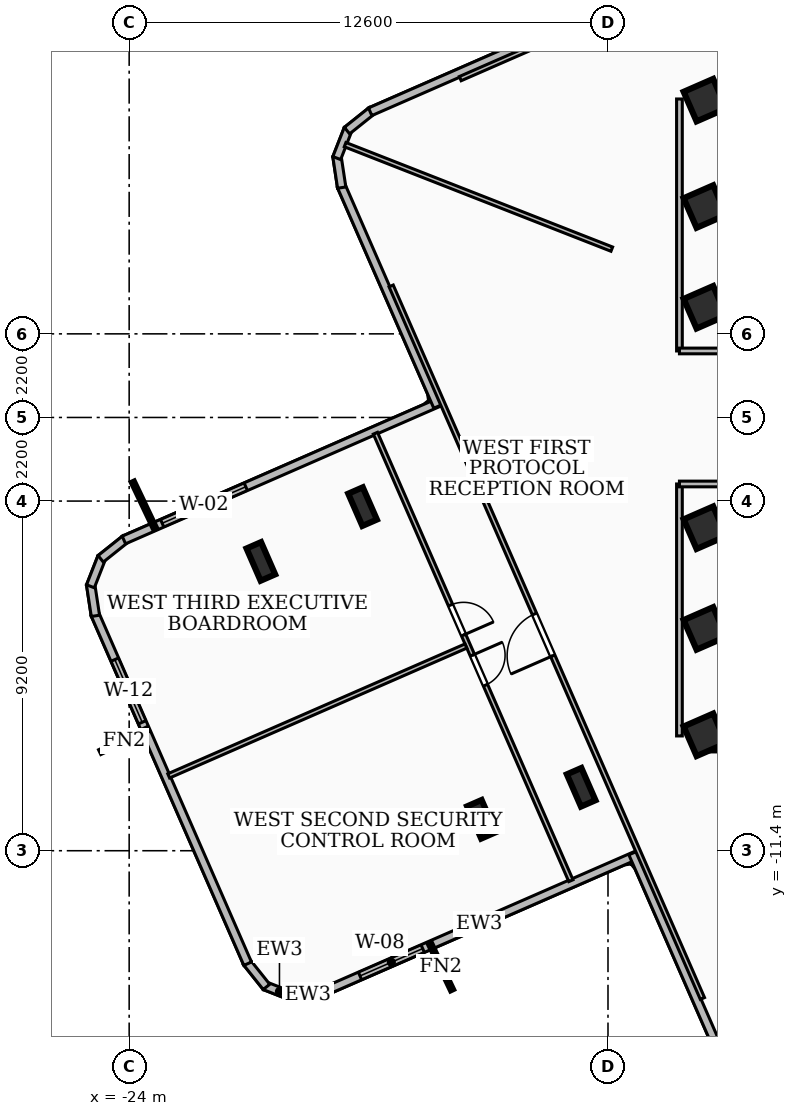
"""IFC4 building model, lengths in metres.
Left out: names, types, materials, properties, quantities, classifications, styles, units other than length and angle.
Written with IfcOpenShell. Run it as: python <this file> out.ifc"""

import sys

from ifc_helpers import new_model, si_unit, direction, frame, frame_2d, origin, origin_2d, place, context, subcontext, project, spatial, rectangle, i_section, extrude, element, fill, save


model = new_model("IFC4")
c1 = context("Model", 3, precision=1e-05, world=origin(), true_north=direction((0.0, 1.0)))
c2 = subcontext(c1, "Body", "Model", "MODEL_VIEW")
j1 = project(units=[si_unit("LENGTHUNIT", "METRE"), si_unit("PLANEANGLEUNIT", "RADIAN")], contexts=[c1])
p1 = place(None, origin())
s1 = spatial("IfcSite", under=j1, at=p1, CompositionType="ELEMENT")
p2 = place(p1, origin())
s2 = spatial("IfcBuilding", under=s1, at=p2, CompositionType="ELEMENT")
p3 = place(p2, frame((0.0, 0.0, 181.08)))
s3 = spatial("IfcBuildingStorey", under=s2, at=p3, CompositionType="ELEMENT", Elevation=181.08)
for number, where, z_axis, x_axis in (
    (1, (-8.78, 8.535, 0.0), (0.0, 0.0, 1.0), (1.0, 0.0, 0.0)),
    (2, (8.78, -8.535, 0.0), (0.0, 0.0, 1.0), (-1.0, 0.0, 0.0)),
):
    element("IfcWall", number, at=place(p3, frame(where, z_axis=z_axis, x_axis=x_axis)), inside=s3, PredefinedType="SHEAR", context=c2, shape_type="SweptSolid", body=[
        extrude(rectangle(XDim=17.56, YDim=0.45, at=frame_2d((8.78, 0.0))), origin(), (0.0, 0.0, 1.0), 3.34),
    ])
for number, where, z_axis, x_axis in (
    (3, (-8.85, -5.55, 0.0), (0.0, 0.0, 1.0), (0.916, 0.4, 0.0)),
    (4, (-8.85, -2.9, 0.0), (0.0, 0.0, 1.0), (0.916, 0.4, 0.0)),
    (5, (-8.85, 2.9, 0.0), (0.0, 0.0, 1.0), (0.916, 0.4, 0.0)),
    (6, (-8.85, 5.55, 0.0), (0.0, 0.0, 1.0), (0.916, 0.4, 0.0)),
    (7, (-8.85, 8.35, 0.0), (0.0, 0.0, 1.0), (0.916, 0.4, 0.0)),
    (8, (-8.85, -8.35, 0.0), (0.0, 0.0, 1.0), (0.916, 0.4, 0.0)),
):
    element("IfcColumn", number, at=place(p3, frame(where, z_axis=z_axis, x_axis=x_axis)), inside=s3, PredefinedType="COLUMN", context=c2, shape_type="SweptSolid", body=[
        extrude(rectangle(XDim=0.85, YDim=0.85, at=origin_2d()), origin(), (0.0, 0.0, 1.0), 3.6),
    ])
for number, where, z_axis, x_axis in (
    (9, (-17.858, -2.346, 0.0), (0.0, 0.0, 1.0), (0.916, 0.4, 0.0)),
    (10, (-12.106, -9.731, 0.0), (0.0, 0.0, 1.0), (0.916, 0.4, 0.0)),
    (11, (-20.535, -3.788, 0.0), (0.0, 0.0, 1.0), (0.916, 0.4, 0.0)),
    (12, (-14.731, -10.573, 0.0), (0.0, 0.0, 1.0), (0.916, 0.4, 0.0)),
):
    element("IfcColumn", number, at=place(p3, frame(where, z_axis=z_axis, x_axis=x_axis)), inside=s3, PredefinedType="COLUMN", context=c2, shape_type="SweptSolid", body=[
        extrude(i_section(OverallWidth=0.418, OverallDepth=0.927, WebThickness=0.019, FlangeThickness=0.032, at=origin_2d()), origin(), (0.0, 0.0, 1.0), 3.6),
    ])
p4 = place(p3, frame((-10.634, -11.51, 0.0), z_axis=(0.0, 0.0, 1.0), x_axis=(-0.91637186732, -0.400328116405, 0.0)))
e13 = element("IfcWall", 13, at=p4, inside=s3, PredefinedType="SOLIDWALL", context=c2, shape_type="SweptSolid", body=[
    extrude(rectangle(XDim=9.058, YDim=0.22, at=frame_2d((4.529, 0.0))), origin(), (0.0, 0.0, 1.0), 3.34),
])
p5 = place(p4, frame((6.157, 0.0, 0.85)))
e14 = element("IfcOpeningElement", 14, at=p5, cuts=e13, PredefinedType="OPENING", context=c2, shape_type="SweptSolid", body=[
    extrude(rectangle(XDim=1.8, YDim=1.8, at=frame_2d((0.9, 0.9))), frame((0.0, 0.12, 0.0), z_axis=(0.0, -1.0, 0.0), x_axis=(1.0, 0.0, 0.0)), (0.0, 0.0, 1.0), 0.24),
])
p6 = place(p3, frame((-18.886, -15.122, 0.0), z_axis=(0.0, 0.0, 1.0), x_axis=(-0.988566813851, -0.150783469095, 0.0)))
e15 = element("IfcWall", 15, at=p6, inside=s3, PredefinedType="SOLIDWALL", context=c2, shape_type="SweptSolid", body=[
    extrude(rectangle(XDim=0.835, YDim=0.22, at=frame_2d((0.418, 0.0))), origin(), (0.0, 0.0, 1.0), 3.34),
])
p7 = place(p3, frame((-19.664, -15.253, 0.0), z_axis=(0.0, 0.0, 1.0), x_axis=(-0.930965246498, 0.36510780574, 0.0)))
e16 = element("IfcWall", 16, at=p7, inside=s3, PredefinedType="SOLIDWALL", context=c2, shape_type="SweptSolid", body=[
    extrude(rectangle(XDim=0.818, YDim=0.22, at=frame_2d((0.409, 0.0))), origin(), (0.0, 0.0, 1.0), 3.34),
])
p8 = place(p3, frame((-20.387, -14.983, 0.0), z_axis=(0.0, 0.0, 1.0), x_axis=(-0.62376780326, 0.781609702867, 0.0)))
e17 = element("IfcWall", 17, at=p8, inside=s3, PredefinedType="SOLIDWALL", context=c2, shape_type="SweptSolid", body=[
    extrude(rectangle(XDim=0.835, YDim=0.22, at=frame_2d((0.417, 0.0))), origin(), (0.0, 0.0, 1.0), 3.34),
])
p9 = place(p3, frame((-20.882, -14.373, 0.0), z_axis=(0.0, 0.0, 1.0), x_axis=(-0.400368522196, 0.916354214502, 0.0)))
e18 = element("IfcWall", 18, at=p9, inside=s3, PredefinedType="SOLIDWALL", context=c2, shape_type="SweptSolid", body=[
    extrude(rectangle(XDim=10.041, YDim=0.22, at=frame_2d((5.021, 0.0))), origin(), (0.0, 0.0, 1.0), 3.34),
])
p10 = place(p9, frame((6.932, 0.0, 0.85)))
e19 = element("IfcOpeningElement", 19, at=p10, cuts=e18, PredefinedType="OPENING", context=c2, shape_type="SweptSolid", body=[
    extrude(rectangle(XDim=1.8, YDim=1.6, at=frame_2d((0.9, 0.8))), frame((0.0, 0.12, 0.0), z_axis=(0.0, -1.0, 0.0), x_axis=(1.0, 0.0, 0.0)), (0.0, 0.0, 1.0), 0.24),
])
p11 = place(p3, frame((-24.888, -5.22, 0.0), z_axis=(0.0, 0.0, 1.0), x_axis=(-0.150783469095, 0.988566813851, 0.0)))
e20 = element("IfcWall", 20, at=p11, inside=s3, PredefinedType="SOLIDWALL", context=c2, shape_type="SweptSolid", body=[
    extrude(rectangle(XDim=0.835, YDim=0.22, at=frame_2d((0.418, 0.0))), origin(), (0.0, 0.0, 1.0), 3.34),
])
p12 = place(p3, frame((-25.019, -4.442, 0.0), z_axis=(0.0, 0.0, 1.0), x_axis=(0.365366290938, 0.93086383185, 0.0)))
e21 = element("IfcWall", 21, at=p12, inside=s3, PredefinedType="SOLIDWALL", context=c2, shape_type="SweptSolid", body=[
    extrude(rectangle(XDim=0.819, YDim=0.22, at=frame_2d((0.409, 0.0))), origin(), (0.0, 0.0, 1.0), 3.34),
])
p13 = place(p3, frame((-24.749, -3.719, 0.0), z_axis=(0.0, 0.0, 1.0), x_axis=(0.781723393747, 0.623625316731, 0.0)))
e22 = element("IfcWall", 22, at=p13, inside=s3, PredefinedType="SOLIDWALL", context=c2, shape_type="SweptSolid", body=[
    extrude(rectangle(XDim=0.835, YDim=0.22, at=frame_2d((0.418, 0.0))), origin(), (0.0, 0.0, 1.0), 3.34),
])
p14 = place(p3, frame((-24.139, -3.224, 0.0), z_axis=(0.0, 0.0, 1.0), x_axis=(0.916356987606, 0.400362175117, 0.0)))
e23 = element("IfcWall", 23, at=p14, inside=s3, PredefinedType="SOLIDWALL", context=c2, shape_type="SweptSolid", body=[
    extrude(rectangle(XDim=9.06, YDim=0.22, at=frame_2d((4.53, 0.0))), origin(), (0.0, 0.0, 1.0), 3.34),
])
p15 = place(p14, frame((1.1, 0.0, 0.85)))
e24 = element("IfcOpeningElement", 24, at=p15, cuts=e23, PredefinedType="OPENING", context=c2, shape_type="SweptSolid", body=[
    extrude(rectangle(XDim=2.4, YDim=2.1, at=frame_2d((1.2, 1.05))), frame((0.0, 0.12, 0.0), z_axis=(0.0, -1.0, 0.0), x_axis=(1.0, 0.0, 0.0)), (0.0, 0.0, 1.0), 0.24),
])
p16 = place(p3, frame((-15.883, 0.287, 0.0), z_axis=(0.0, 0.0, 1.0), x_axis=(-0.400352069216, 0.916361402872, 0.0)))
e25 = element("IfcWall", 25, at=p16, inside=s3, PredefinedType="SOLIDWALL", context=c2, shape_type="SweptSolid", body=[
    extrude(rectangle(XDim=6.339, YDim=0.22, at=frame_2d((3.169, 0.0))), origin(), (0.0, 0.0, 1.0), 3.34),
])
p17 = place(p3, frame((-18.407, 6.048, 0.0), z_axis=(0.0, 0.0, 1.0), x_axis=(-0.149814047271, 0.988714190876, 0.0)))
e26 = element("IfcWall", 26, at=p17, inside=s3, PredefinedType="SOLIDWALL", context=c2, shape_type="SweptSolid", body=[
    extrude(rectangle(XDim=0.834, YDim=0.22, at=frame_2d((0.417, 0.0))), origin(), (0.0, 0.0, 1.0), 3.34),
])
p18 = place(p3, frame((-18.537, 6.825, 0.0), z_axis=(0.0, 0.0, 1.0), x_axis=(0.364331843435, 0.931269191941, 0.0)))
e27 = element("IfcWall", 27, at=p18, inside=s3, PredefinedType="SOLIDWALL", context=c2, shape_type="SweptSolid", body=[
    extrude(rectangle(XDim=0.818, YDim=0.22, at=frame_2d((0.409, 0.0))), origin(), (0.0, 0.0, 1.0), 3.34),
])
p19 = place(p3, frame((-18.268, 7.548, 0.0), z_axis=(0.0, 0.0, 1.0), x_axis=(0.781153625844, 0.624338860581, 0.0)))
e28 = element("IfcWall", 28, at=p19, inside=s3, PredefinedType="SOLIDWALL", context=c2, shape_type="SweptSolid", body=[
    extrude(rectangle(XDim=0.836, YDim=0.22, at=frame_2d((0.418, 0.0))), origin(), (0.0, 0.0, 1.0), 3.34),
])
for number, where, z_axis, x_axis in (
    (29, (-17.658, 8.044, 0.0), (0.0, 0.0, 1.0), (0.916, 0.4, 0.0)),
    (30, (-8.044, -17.658, 0.0), (0.0, 0.0, 1.0), (-0.4, 0.916, 0.0)),
):
    element("IfcWall", number, at=place(p3, frame(where, z_axis=z_axis, x_axis=x_axis)), inside=s3, PredefinedType="SOLIDWALL", context=c2, shape_type="SweptSolid", body=[
        extrude(rectangle(XDim=6.759, YDim=0.22, at=frame_2d((3.38, 0.0))), origin(), (0.0, 0.0, 1.0), 3.34),
    ])
p20 = place(p3, frame((-9.52, 1.75, 0.0), z_axis=(0.0, 0.0, 1.0), x_axis=(0.0, 1.0, 0.0)))
e31 = element("IfcWall", 31, at=p20, inside=s3, PredefinedType="PARTITIONING", context=c2, shape_type="SweptSolid", body=[
    extrude(rectangle(XDim=6.63, YDim=0.15, at=frame_2d((3.315, 0.0))), origin(), (0.0, 0.0, 1.0), 3.34),
])
p21 = place(p3, frame((-7.85, 1.75, 0.0), z_axis=(0.0, 0.0, 1.0), x_axis=(-1.0, 0.0, 0.0)))
e32 = element("IfcWall", 32, at=p21, inside=s3, PredefinedType="PARTITIONING", context=c2, shape_type="SweptSolid", body=[
    extrude(rectangle(XDim=1.67, YDim=0.15, at=frame_2d((0.835, 0.0))), origin(), (0.0, 0.0, 1.0), 2.57),
])
p22 = place(p3, frame((-9.52, -8.38, 0.0), z_axis=(0.0, 0.0, 1.0), x_axis=(0.0, 1.0, 0.0)))
e33 = element("IfcWall", 33, at=p22, inside=s3, PredefinedType="PARTITIONING", context=c2, shape_type="SweptSolid", body=[
    extrude(rectangle(XDim=6.63, YDim=0.15, at=frame_2d((3.315, 0.0))), origin(), (0.0, 0.0, 1.0), 2.644),
])
p23 = place(p3, frame((-7.85, -1.75, 0.0), z_axis=(0.0, 0.0, 1.0), x_axis=(-1.0, 0.0, 0.0)))
e34 = element("IfcWall", 34, at=p23, inside=s3, PredefinedType="PARTITIONING", context=c2, shape_type="SweptSolid", body=[
    extrude(rectangle(XDim=1.67, YDim=0.15, at=frame_2d((0.835, 0.0))), origin(), (0.0, 0.0, 1.0), 2.57),
])
p24 = place(p3, frame((-11.3, 4.429, 0.0), z_axis=(0.0, 0.0, 1.0), x_axis=(-0.931071596241, 0.364836514995, 0.0)))
e35 = element("IfcWall", 35, at=p24, inside=s3, PredefinedType="PARTITIONING", context=c2, shape_type="SweptSolid", body=[
    extrude(rectangle(XDim=7.538, YDim=0.12, at=frame_2d((3.769, 0.0))), origin(), (0.0, 0.0, 1.0), 3.34),
])
p25 = place(p3, frame((-15.288, 8.915, 0.0), z_axis=(0.0, 0.0, 1.0), x_axis=(0.916368627962, 0.400335531383, 0.0)))
e36 = element("IfcWall", 36, at=p25, inside=s3, PredefinedType="PARTITIONING", context=c2, shape_type="SweptSolid", body=[
    extrude(rectangle(XDim=20.46, YDim=0.12, at=frame_2d((10.23, 0.0))), origin(), (0.0, 0.0, 1.0), 2.644),
])
p26 = place(p25, frame((9.84, 0.0, 0.0)))
e37 = element("IfcOpeningElement", 37, at=p26, cuts=e36, PredefinedType="OPENING", context=c2, shape_type="SweptSolid", body=[
    extrude(rectangle(XDim=1.2, YDim=2.1, at=frame_2d((0.6, 1.05))), frame((0.0, 0.07, 0.0), z_axis=(0.0, -1.0, 0.0), x_axis=(1.0, 0.0, 0.0)), (0.0, 0.0, 1.0), 0.14),
])
p27 = place(p3, frame((-8.915, -15.288, 0.0), z_axis=(0.0, 0.0, 1.0), x_axis=(-0.400335531383, 0.916368627962, 0.0)))
e38 = element("IfcWall", 38, at=p27, inside=s3, PredefinedType="PARTITIONING", context=c2, shape_type="SweptSolid", body=[
    extrude(rectangle(XDim=20.46, YDim=0.12, at=frame_2d((10.23, 0.0))), origin(), (0.0, 0.0, 1.0), 2.644),
])
p28 = place(p27, frame((9.84, 0.0, 0.0)))
e39 = element("IfcOpeningElement", 39, at=p28, cuts=e38, PredefinedType="OPENING", context=c2, shape_type="SweptSolid", body=[
    extrude(rectangle(XDim=1.2, YDim=2.1, at=frame_2d((0.6, 1.05))), frame((0.0, 0.07, 0.0), z_axis=(0.0, -1.0, 0.0), x_axis=(1.0, 0.0, 0.0)), (0.0, 0.0, 1.0), 0.14),
])
p29 = place(p3, frame((-15.139, -6.014, 0.0), z_axis=(0.0, 0.0, 1.0), x_axis=(-0.916360078354, -0.400355100878, 0.0)))
e40 = element("IfcWall", 40, at=p29, inside=s3, PredefinedType="PARTITIONING", context=c2, shape_type="SweptSolid", body=[
    extrude(rectangle(XDim=8.535, YDim=0.12, at=frame_2d((4.268, 0.0))), origin(), (0.0, 0.0, 1.0), 3.34),
])
p30 = place(p3, frame((-17.52, -0.414, 0.0), z_axis=(0.0, 0.0, 1.0), x_axis=(0.400330383156, -0.916370877059, 0.0)))
e41 = element("IfcWall", 41, at=p30, inside=s3, PredefinedType="PARTITIONING", context=c2, shape_type="SweptSolid", body=[
    extrude(rectangle(XDim=12.85, YDim=0.12, at=frame_2d((6.425, 0.0))), origin(), (0.0, 0.0, 1.0), 2.644),
])
p31 = place(p30, frame((4.935, 0.0, 0.0)))
e42 = element("IfcOpeningElement", 42, at=p31, cuts=e41, PredefinedType="OPENING", context=c2, shape_type="SweptSolid", body=[
    extrude(rectangle(XDim=0.86, YDim=2.04, at=frame_2d((0.43, 1.02))), frame((0.0, 0.07, 0.0), z_axis=(0.0, -1.0, 0.0), x_axis=(1.0, 0.0, 0.0)), (0.0, 0.0, 1.0), 0.14),
])
p32 = place(p30, frame((6.375, 0.0, 0.0)))
e43 = element("IfcOpeningElement", 43, at=p32, cuts=e41, PredefinedType="OPENING", context=c2, shape_type="SweptSolid", body=[
    extrude(rectangle(XDim=0.86, YDim=2.04, at=frame_2d((0.43, 1.02))), frame((0.0, 0.07, 0.0), z_axis=(0.0, -1.0, 0.0), x_axis=(1.0, 0.0, 0.0)), (0.0, 0.0, 1.0), 0.14),
])
p33 = place(p5, origin())
e44 = element("IfcWindow", 44, at=p33, inside=s3, PartitioningType="SINGLE_PANEL", PredefinedType="WINDOW", context=c2, shape_type="SweptSolid", body=[
    extrude(rectangle(XDim=1.8, YDim=1.8, at=frame_2d((0.9, 0.9))), frame((0.0, 0.03, 0.0), z_axis=(0.0, -1.0, 0.0), x_axis=(1.0, 0.0, 0.0)), (0.0, 0.0, 1.0), 0.06),
])
fill(e14, e44)
p34 = place(p10, origin())
e45 = element("IfcWindow", 45, at=p34, inside=s3, PartitioningType="SINGLE_PANEL", PredefinedType="WINDOW", context=c2, shape_type="SweptSolid", body=[
    extrude(rectangle(XDim=1.8, YDim=1.6, at=frame_2d((0.9, 0.8))), frame((0.0, 0.03, 0.0), z_axis=(0.0, -1.0, 0.0), x_axis=(1.0, 0.0, 0.0)), (0.0, 0.0, 1.0), 0.06),
])
fill(e19, e45)
p35 = place(p15, origin())
e46 = element("IfcWindow", 46, at=p35, inside=s3, PartitioningType="SINGLE_PANEL", PredefinedType="WINDOW", context=c2, shape_type="SweptSolid", body=[
    extrude(rectangle(XDim=2.4, YDim=2.1, at=frame_2d((1.2, 1.05))), frame((0.0, 0.03, 0.0), z_axis=(0.0, -1.0, 0.0), x_axis=(1.0, 0.0, 0.0)), (0.0, 0.0, 1.0), 0.06),
])
fill(e24, e46)
p36 = place(p28, origin())
e47 = element("IfcDoor", 47, at=p36, inside=s3, OperationType="SINGLE_SWING_LEFT", PredefinedType="DOOR", context=c2, shape_type="SweptSolid", body=[
    extrude(rectangle(XDim=1.2, YDim=2.1, at=frame_2d((0.6, 1.05))), frame((0.0, 0.025, 0.0), z_axis=(0.0, -1.0, 0.0), x_axis=(1.0, 0.0, 0.0)), (0.0, 0.0, 1.0), 0.05),
])
fill(e39, e47)
p37 = place(p31, origin())
e48 = element("IfcDoor", 48, at=p37, inside=s3, OperationType="SINGLE_SWING_RIGHT", PredefinedType="DOOR", context=c2, shape_type="SweptSolid", body=[
    extrude(rectangle(XDim=0.86, YDim=2.04, at=frame_2d((0.43, 1.02))), frame((0.0, 0.025, 0.0), z_axis=(0.0, -1.0, 0.0), x_axis=(1.0, 0.0, 0.0)), (0.0, 0.0, 1.0), 0.05),
])
fill(e42, e48)
p38 = place(p32, origin())
e49 = element("IfcDoor", 49, at=p38, inside=s3, OperationType="SINGLE_SWING_LEFT", PredefinedType="DOOR", context=c2, shape_type="SweptSolid", body=[
    extrude(rectangle(XDim=0.86, YDim=2.04, at=frame_2d((0.43, 1.02))), frame((0.0, 0.025, 0.0), z_axis=(0.0, -1.0, 0.0), x_axis=(1.0, 0.0, 0.0)), (0.0, 0.0, 1.0), 0.05),
])
fill(e43, e49)
save(model, sys.argv[1])
